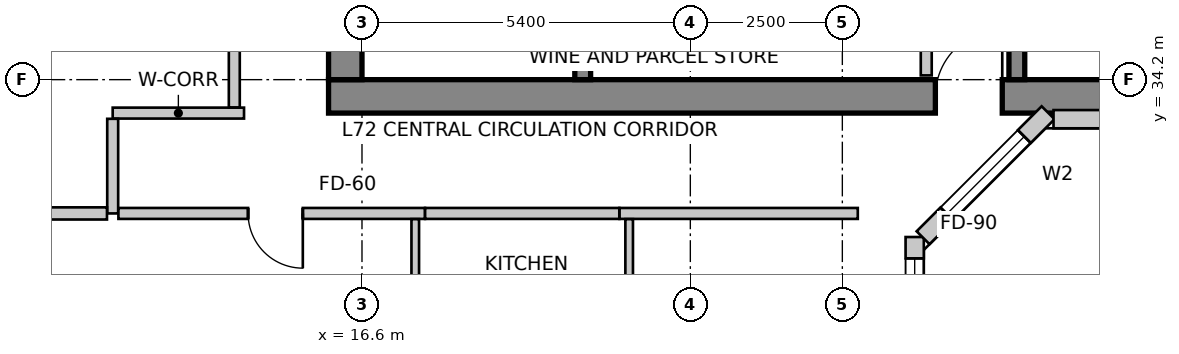
"""IFC4 building model, lengths in metres.
Left out: names, types, materials, properties, quantities, classifications, styles, units other than length and angle.
Written with IfcOpenShell. Run it as: python <this file> out.ifc"""

import sys

from ifc_helpers import new_model, si_unit, direction, frame, frame_2d, origin, place, context, subcontext, project, spatial, rectangle, extrude, source, transform, mapped, element, fill, save


model = new_model("IFC4")
c1 = context("Model", 3, precision=1e-05, world=origin(), true_north=direction((0.0, 1.0)))
c2 = subcontext(c1, "Body", "Model", "MODEL_VIEW")
j1 = project(units=[si_unit("LENGTHUNIT", "METRE"), si_unit("PLANEANGLEUNIT", "RADIAN")], contexts=[c1])
p1 = place(None, origin())
s1 = spatial("IfcSite", under=j1, at=p1, CompositionType="ELEMENT")
p2 = place(p1, origin())
s2 = spatial("IfcBuilding", under=s1, at=p2, CompositionType="ELEMENT")
p3 = place(p2, frame((0.0, 0.0, 281.7)))
s3 = spatial("IfcBuildingStorey", under=s2, at=p3, CompositionType="ELEMENT", Elevation=281.7)
p4 = place(p3, frame((16.05, 33.925, 0.0), z_axis=(0.0, 0.0, 1.0), x_axis=(1.0, 0.0, 0.0)))
e1 = element("IfcWall", 1, at=p4, inside=s3, PredefinedType="SHEAR", context=c2, shape_type="SweptSolid", body=[
    extrude(rectangle(XDim=15.5, YDim=0.55, at=frame_2d((7.75, 0.0))), origin(), (0.0, 0.0, 1.0), 3.6),
])
m1 = source(origin(), c2, "Body", "SweptSolid", [
    extrude(rectangle(XDim=1.1, YDim=2.15, at=frame_2d((0.55, 1.075))), frame((0.0, 0.285, 0.0), z_axis=(0.0, -1.0, 0.0), x_axis=(1.0, 0.0, 0.0)), (0.0, 0.0, 1.0), 0.57),
])
p5 = place(p4, frame((9.98, 0.0, 0.0)))
e2 = element("IfcOpeningElement", 2, at=p5, cuts=e1, PredefinedType="OPENING", context=c2, shape_type="MappedRepresentation", body=[
    mapped(m1, transform((0.0, 0.0, 0.0), scale=1.0)),
])
p6 = place(p3, frame((16.325, 34.2, 0.0), z_axis=(0.0, 0.0, 1.0), x_axis=(0.0, 1.0, 0.0)))
e3 = element("IfcWall", 3, at=p6, inside=s3, PredefinedType="SHEAR", context=c2, shape_type="SweptSolid", body=[
    extrude(rectangle(XDim=11.4, YDim=0.55, at=frame_2d((5.7, 0.0))), origin(), (0.0, 0.0, 1.0), 3.6),
])
p7 = place(p6, frame((7.15, 0.0, 0.0)))
e4 = element("IfcOpeningElement", 4, at=p7, cuts=e3, PredefinedType="OPENING", context=c2, shape_type="MappedRepresentation", body=[
    mapped(m1, transform((0.0, 0.0, 0.0), scale=1.0)),
])
p8 = place(p3, frame((20.23, 34.2, 0.0), z_axis=(0.0, 0.0, 1.0), x_axis=(0.0, 1.0, 0.0)))
e5 = element("IfcWall", 5, at=p8, inside=s3, PredefinedType="SHEAR", context=c2, shape_type="SweptSolid", body=[
    extrude(rectangle(XDim=9.06, YDim=0.26, at=frame_2d((4.53, 0.0))), origin(), (0.0, 0.0, 1.0), 3.6),
])
m2 = source(origin(), c2, "Body", "SweptSolid", [
    extrude(rectangle(XDim=1.1, YDim=2.15, at=frame_2d((0.55, 1.075))), frame((0.0, 0.14, 0.0), z_axis=(0.0, -1.0, 0.0), x_axis=(1.0, 0.0, 0.0)), (0.0, 0.0, 1.0), 0.28),
])
p9 = place(p8, frame((7.45, 0.0, 0.0)))
e6 = element("IfcOpeningElement", 6, at=p9, cuts=e5, PredefinedType="OPENING", context=c2, shape_type="MappedRepresentation", body=[
    mapped(m2, transform((0.0, 0.0, 0.0), scale=1.0)),
])
p10 = place(p3, frame((27.37, 34.2, 0.0), z_axis=(0.0, 0.0, 1.0), x_axis=(0.0, 1.0, 0.0)))
e7 = element("IfcWall", 7, at=p10, inside=s3, PredefinedType="SHEAR", context=c2, shape_type="SweptSolid", body=[
    extrude(rectangle(XDim=9.06, YDim=0.26, at=frame_2d((4.53, 0.0))), origin(), (0.0, 0.0, 1.0), 3.6),
])
p11 = place(p10, frame((7.45, 0.0, 0.0)))
e8 = element("IfcOpeningElement", 8, at=p11, cuts=e7, PredefinedType="OPENING", context=c2, shape_type="MappedRepresentation", body=[
    mapped(m2, transform((0.0, 0.0, 0.0), scale=1.0)),
])
p12 = place(p3, frame((25.69, 24.957, 0.0), z_axis=(0.0, 0.0, 1.0), x_axis=(0.0, 1.0, 0.0)))
e9 = element("IfcWall", 9, at=p12, inside=s3, PredefinedType="SOLIDWALL", context=c2, shape_type="SweptSolid", body=[
    extrude(rectangle(XDim=6.655, YDim=0.3, at=frame_2d((3.327, 0.0))), origin(), (0.0, 0.0, 1.0), 3.35),
])
m3 = source(origin(), c2, "Body", "SweptSolid", [
    extrude(rectangle(XDim=1.6, YDim=2.15, at=frame_2d((0.8, 1.075))), frame((0.0, 0.16, 0.0), z_axis=(0.0, -1.0, 0.0), x_axis=(1.0, 0.0, 0.0)), (0.0, 0.0, 1.0), 0.32),
])
p13 = place(p12, frame((2.293, 0.0, 0.0)))
e10 = element("IfcOpeningElement", 10, at=p13, cuts=e9, PredefinedType="OPENING", context=c2, shape_type="MappedRepresentation", body=[
    mapped(m3, transform((0.0, 0.0, 0.0), scale=1.0)),
])
m4 = source(origin(), c2, "Body", "SweptSolid", [
    extrude(rectangle(XDim=1.2, YDim=1.6, at=frame_2d((0.6, 0.8))), frame((0.0, 0.16, 0.0), z_axis=(0.0, -1.0, 0.0), x_axis=(1.0, 0.0, 0.0)), (0.0, 0.0, 1.0), 0.32),
])
p14 = place(p12, frame((0.413, 0.0, 0.85)))
e11 = element("IfcOpeningElement", 11, at=p14, cuts=e9, PredefinedType="OPENING", context=c2, shape_type="MappedRepresentation", body=[
    mapped(m4, transform((0.0, 0.0, 0.0), scale=1.0)),
])
m5 = source(origin(), c2, "Body", "SweptSolid", [
    extrude(rectangle(XDim=2.1, YDim=2.0, at=frame_2d((1.05, 1.0))), frame((0.0, 0.16, 0.0), z_axis=(0.0, -1.0, 0.0), x_axis=(1.0, 0.0, 0.0)), (0.0, 0.0, 1.0), 0.32),
])
p15 = place(p12, frame((4.204, 0.0, 0.85)))
e12 = element("IfcOpeningElement", 12, at=p15, cuts=e9, PredefinedType="OPENING", context=c2, shape_type="MappedRepresentation", body=[
    mapped(m5, transform((0.0, 0.0, 0.0), scale=1.0)),
])
p16 = place(p3, frame((25.828, 31.6, 0.0), z_axis=(0.0, 0.0, 1.0), x_axis=(0.707106781187, 0.707106781187, 0.0)))
e13 = element("IfcWall", 13, at=p16, inside=s3, PredefinedType="SOLIDWALL", context=c2, shape_type="SweptSolid", body=[
    extrude(rectangle(XDim=2.907, YDim=0.3, at=frame_2d((1.454, 0.0))), origin(), (0.0, 0.0, 1.0), 3.35),
])
m6 = source(origin(), c2, "Body", "SweptSolid", [
    extrude(rectangle(XDim=1.8, YDim=2.1, at=frame_2d((0.9, 1.05))), frame((0.0, 0.16, 0.0), z_axis=(0.0, -1.0, 0.0), x_axis=(1.0, 0.0, 0.0)), (0.0, 0.0, 1.0), 0.32),
])
p17 = place(p16, frame((0.554, 0.0, 0.85)))
e14 = element("IfcOpeningElement", 14, at=p17, cuts=e13, PredefinedType="OPENING", context=c2, shape_type="MappedRepresentation", body=[
    mapped(m6, transform((0.0, 0.0, 0.0), scale=1.0)),
])
p18 = place(p3, frame((27.973, 33.55, 0.0), z_axis=(0.0, 0.0, 1.0), x_axis=(1.0, 0.0, 0.0)))
e15 = element("IfcWall", 15, at=p18, inside=s3, PredefinedType="SOLIDWALL", context=c2, shape_type="SweptSolid", body=[
    extrude(rectangle(XDim=9.115, YDim=0.3, at=frame_2d((4.558, 0.0))), origin(), (0.0, 0.0, 1.0), 3.35),
])
m7 = source(origin(), c2, "Body", "SweptSolid", [
    extrude(rectangle(XDim=2.4, YDim=2.2, at=frame_2d((1.2, 1.1))), frame((0.0, 0.16, 0.0), z_axis=(0.0, -1.0, 0.0), x_axis=(1.0, 0.0, 0.0)), (0.0, 0.0, 1.0), 0.32),
])
p19 = place(p18, frame((1.239, 0.0, 0.85)))
e16 = element("IfcOpeningElement", 16, at=p19, cuts=e15, PredefinedType="OPENING", context=c2, shape_type="MappedRepresentation", body=[
    mapped(m7, transform((0.0, 0.0, 0.0), scale=1.0)),
])
p20 = place(p18, frame((5.626, 0.0, 0.85)))
e17 = element("IfcOpeningElement", 17, at=p20, cuts=e15, PredefinedType="OPENING", context=c2, shape_type="MappedRepresentation", body=[
    mapped(m5, transform((0.0, 0.0, 0.0), scale=1.0)),
])
p21 = place(p3, frame((25.88, 35.956, 0.0), z_axis=(0.0, 0.0, 1.0), x_axis=(0.0, -1.0, 0.0)))
e18 = element("IfcWall", 18, at=p21, inside=s3, PredefinedType="PARTITIONING", context=c2, shape_type="SweptSolid", body=[
    extrude(rectangle(XDim=1.686, YDim=0.18, at=frame_2d((0.843, 0.0))), origin(), (0.0, 0.0, 1.0), 2.642),
])
p22 = place(p3, frame((12.5, 33.65, 0.0), z_axis=(0.0, 0.0, 1.0), x_axis=(1.0, 0.0, 0.0)))
e19 = element("IfcWall", 19, at=p22, inside=s3, PredefinedType="PARTITIONING", context=c2, shape_type="SweptSolid", body=[
    extrude(rectangle(XDim=2.16, YDim=0.18, at=frame_2d((1.08, 0.0))), origin(), (0.0, 0.0, 1.0), 3.35),
])
p23 = place(p3, frame((12.5, 32.0, 0.0), z_axis=(0.0, 0.0, 1.0), x_axis=(0.0, 1.0, 0.0)))
e20 = element("IfcWall", 20, at=p23, inside=s3, PredefinedType="PARTITIONING", context=c2, shape_type="SweptSolid", body=[
    extrude(rectangle(XDim=1.556, YDim=0.18, at=frame_2d((0.778, 0.0))), origin(), (0.0, 0.0, 1.0), 2.935),
])
p24 = place(p3, frame((24.754, 32.0, 0.0), z_axis=(0.0, 0.0, 1.0), x_axis=(-1.0, 0.0, 0.0)))
e21 = element("IfcWall", 21, at=p24, inside=s3, PredefinedType="PARTITIONING", context=c2, shape_type="SweptSolid", body=[
    extrude(rectangle(XDim=3.92, YDim=0.18, at=frame_2d((1.96, 0.0))), origin(), (0.0, 0.0, 1.0), 2.935),
])
p25 = place(p3, frame((17.636, 32.0, 0.0), z_axis=(0.0, 0.0, 1.0), x_axis=(-1.0, 0.0, 0.0)))
e22 = element("IfcWall", 22, at=p25, inside=s3, PredefinedType="PARTITIONING", context=c2, shape_type="SweptSolid", body=[
    extrude(rectangle(XDim=5.042, YDim=0.18, at=frame_2d((2.521, 0.0))), origin(), (0.0, 0.0, 1.0), 2.935),
])
m8 = source(origin(), c2, "Body", "SweptSolid", [
    extrude(rectangle(XDim=0.9, YDim=2.15, at=frame_2d((0.45, 1.075))), frame((0.0, 0.1, 0.0), z_axis=(0.0, -1.0, 0.0), x_axis=(1.0, 0.0, 0.0)), (0.0, 0.0, 1.0), 0.2),
])
p26 = place(p25, frame((2.009, 0.0, 0.0)))
e23 = element("IfcOpeningElement", 23, at=p26, cuts=e22, PredefinedType="OPENING", context=c2, shape_type="MappedRepresentation", body=[
    mapped(m8, transform((0.0, 0.0, 0.0), scale=1.0)),
])
p27 = place(p3, frame((20.832, 32.0, 0.0), z_axis=(0.0, 0.0, 1.0), x_axis=(-1.0, 0.0, 0.0)))
e24 = element("IfcWall", 24, at=p27, inside=s3, PredefinedType="PARTITIONING", context=c2, shape_type="SweptSolid", body=[
    extrude(rectangle(XDim=3.194, YDim=0.18, at=frame_2d((1.597, 0.0))), origin(), (0.0, 0.0, 1.0), 3.35),
])
p28 = place(p3, frame((14.5, 33.744, 0.0), z_axis=(0.0, 0.0, 1.0), x_axis=(0.0, 1.0, 0.0)))
e25 = element("IfcWall", 25, at=p28, inside=s3, PredefinedType="PARTITIONING", context=c2, shape_type="SweptSolid", body=[
    extrude(rectangle(XDim=12.406, YDim=0.18, at=frame_2d((6.203, 0.0))), origin(), (0.0, 0.0, 1.0), 3.35),
])
p29 = place(p28, frame((4.37, 0.0, 0.0)))
e26 = element("IfcOpeningElement", 26, at=p29, cuts=e25, PredefinedType="OPENING", context=c2, shape_type="MappedRepresentation", body=[
    mapped(m8, transform((0.0, 0.0, 0.0), scale=1.0)),
])
p30 = place(p3, frame((12.406, 32.0, 0.0), z_axis=(0.0, 0.0, 1.0), x_axis=(-1.0, 0.0, 0.0)))
e27 = element("IfcWall", 27, at=p30, inside=s3, PredefinedType="PARTITIONING", context=c2, shape_type="SweptSolid", body=[
    extrude(rectangle(XDim=4.126, YDim=0.2, at=frame_2d((2.063, 0.0))), origin(), (0.0, 0.0, 1.0), 2.642),
])
p31 = place(p3, frame((20.994, 26.883, 0.0), z_axis=(0.0, 0.0, 1.0), x_axis=(0.0, 1.0, 0.0)))
e28 = element("IfcWall", 28, at=p31, inside=s3, PredefinedType="PARTITIONING", context=c2, shape_type="SweptSolid", body=[
    extrude(rectangle(XDim=5.023, YDim=0.125, at=frame_2d((2.511, 0.0))), origin(), (0.0, 0.0, 1.0), 2.935),
])
m9 = source(origin(), c2, "Body", "SweptSolid", [
    extrude(rectangle(XDim=0.9, YDim=2.15, at=frame_2d((0.45, 1.075))), frame((0.0, 0.073, 0.0), z_axis=(0.0, -1.0, 0.0), x_axis=(1.0, 0.0, 0.0)), (0.0, 0.0, 1.0), 0.145),
])
p32 = place(p31, frame((2.0, 0.0, 0.0)))
e29 = element("IfcOpeningElement", 29, at=p32, cuts=e28, PredefinedType="OPENING", context=c2, shape_type="MappedRepresentation", body=[
    mapped(m9, transform((0.0, 0.0, 0.0), scale=1.0)),
])
p33 = place(p3, frame((17.476, 31.906, 0.0), z_axis=(0.0, 0.0, 1.0), x_axis=(0.0, -1.0, 0.0)))
e30 = element("IfcWall", 30, at=p33, inside=s3, PredefinedType="PARTITIONING", context=c2, shape_type="SweptSolid", body=[
    extrude(rectangle(XDim=5.023, YDim=0.125, at=frame_2d((2.511, 0.0))), origin(), (0.0, 0.0, 1.0), 2.935),
])
m10 = source(origin(), c2, "Body", "SweptSolid", [
    extrude(rectangle(XDim=0.85, YDim=2.15, at=frame_2d((0.425, 1.075))), frame((0.0, 0.073, 0.0), z_axis=(0.0, -1.0, 0.0), x_axis=(1.0, 0.0, 0.0)), (0.0, 0.0, 1.0), 0.145),
])
p34 = place(p33, frame((2.086, 0.0, 0.0)))
e31 = element("IfcOpeningElement", 31, at=p34, cuts=e30, PredefinedType="OPENING", context=c2, shape_type="MappedRepresentation", body=[
    mapped(m10, transform((0.0, 0.0, 0.0), scale=1.0)),
])
m11 = source(origin(), c2, "Body", "SweptSolid", [
    extrude(rectangle(XDim=2.1, YDim=2.0, at=frame_2d((1.05, 1.0))), frame((0.0, -0.015, 0.0), z_axis=(0.0, -1.0, 0.0), x_axis=(1.0, 0.0, 0.0)), (0.0, 0.0, 1.0), 0.06),
])
p35 = place(p15, origin())
e32 = element("IfcWindow", 32, at=p35, inside=s3, PartitioningType="SINGLE_PANEL", PredefinedType="WINDOW", context=c2, shape_type="MappedRepresentation", body=[
    mapped(m11, transform((0.0, 0.0, 0.0), scale=1.0)),
])
fill(e12, e32)
m12 = source(origin(), c2, "Body", "SweptSolid", [
    extrude(rectangle(XDim=1.8, YDim=2.1, at=frame_2d((0.9, 1.05))), frame((0.0, -0.015, 0.0), z_axis=(0.0, -1.0, 0.0), x_axis=(1.0, 0.0, 0.0)), (0.0, 0.0, 1.0), 0.06),
])
p36 = place(p17, origin())
e33 = element("IfcWindow", 33, at=p36, inside=s3, PartitioningType="SINGLE_PANEL", PredefinedType="WINDOW", context=c2, shape_type="MappedRepresentation", body=[
    mapped(m12, transform((0.0, 0.0, 0.0), scale=1.0)),
])
fill(e14, e33)
m13 = source(origin(), c2, "Body", "SweptSolid", [
    extrude(rectangle(XDim=1.1, YDim=2.15, at=frame_2d((0.55, 1.075))), frame((0.0, 0.025, 0.0), z_axis=(0.0, -1.0, 0.0), x_axis=(1.0, 0.0, 0.0)), (0.0, 0.0, 1.0), 0.05),
])
p37 = place(p5, origin())
e34 = element("IfcDoor", 34, at=p37, inside=s3, OperationType="SINGLE_SWING_RIGHT", PredefinedType="DOOR", context=c2, shape_type="MappedRepresentation", body=[
    mapped(m13, transform((0.0, 0.0, 0.0), scale=1.0)),
])
fill(e2, e34)
m14 = source(origin(), c2, "Body", "SweptSolid", [
    extrude(rectangle(XDim=0.9, YDim=2.15, at=frame_2d((0.45, 1.075))), frame((0.0, 0.025, 0.0), z_axis=(0.0, -1.0, 0.0), x_axis=(1.0, 0.0, 0.0)), (0.0, 0.0, 1.0), 0.05),
])
p38 = place(p26, origin())
e35 = element("IfcDoor", 35, at=p38, inside=s3, OperationType="SINGLE_SWING_LEFT", PredefinedType="DOOR", context=c2, shape_type="MappedRepresentation", body=[
    mapped(m14, transform((0.0, 0.0, 0.0), scale=1.0)),
])
fill(e23, e35)
save(model, sys.argv[1])
